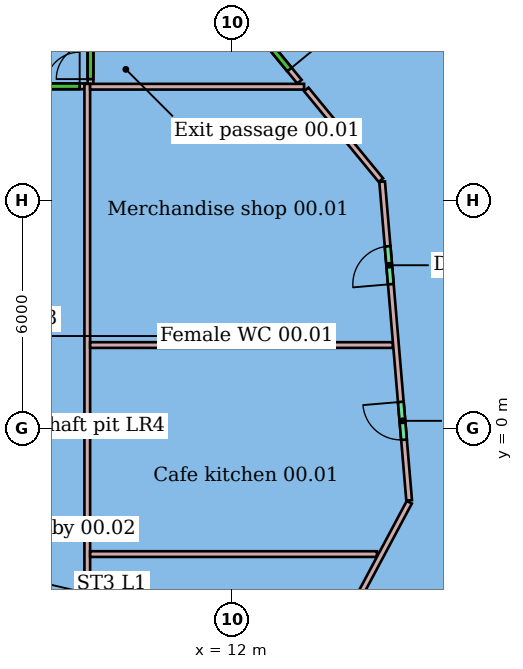
"""IFC4 building model, lengths in metres.
Left out: names, types, materials, properties, quantities, classifications, styles, units other than length and angle.
Written with IfcOpenShell. Run it as: python <this file> out.ifc"""

import sys

from ifc_helpers import new_model, si_unit, direction, frame, frame_2d, origin, place, context, subcontext, project, spatial, rectangle, extrude, element, fill, save


model = new_model("IFC4")
c1 = context("Model", 3, precision=1e-05, world=origin(), true_north=direction((0.0, 1.0)))
c2 = subcontext(c1, "Body", "Model", "MODEL_VIEW")
j1 = project(units=[si_unit("LENGTHUNIT", "METRE"), si_unit("PLANEANGLEUNIT", "RADIAN")], contexts=[c1])
p1 = place(None, origin())
s1 = spatial("IfcSite", under=j1, at=p1, CompositionType="ELEMENT")
p2 = place(p1, origin())
s2 = spatial("IfcBuilding", under=s1, at=p2, CompositionType="ELEMENT")
p3 = place(p2, origin())
s3 = spatial("IfcBuildingStorey", under=s2, at=p3, CompositionType="ELEMENT", Elevation=0.0)
p4 = place(p3, frame((8.2, -11.125, 0.0), z_axis=(0.0, 0.0, 1.0), x_axis=(0.0, 1.0, 0.0)))
e1 = element("IfcWall", 1, at=p4, inside=s3, PredefinedType="PARTITIONING", context=c2, shape_type="SweptSolid", body=[
    extrude(rectangle(XDim=20.2, YDim=0.15, at=frame_2d((10.1, 0.0))), origin(), (0.0, 0.0, 1.0), 7.35),
])
p5 = place(p3, frame((8.275, 9.0, 0.0), z_axis=(0.0, 0.0, 1.0), x_axis=(1.0, 0.0, 0.0)))
e2 = element("IfcWall", 2, at=p5, inside=s3, PredefinedType="PARTITIONING", context=c2, shape_type="SweptSolid", body=[
    extrude(rectangle(XDim=5.631, YDim=0.15, at=frame_2d((2.815, 0.0))), origin(), (0.0, 0.0, 1.0), 7.35),
])
p6 = place(p3, frame((13.964, 8.929, 0.0), z_axis=(0.0, 0.0, 1.0), x_axis=(0.635017397711, -0.772497834692, 0.0)))
e3 = element("IfcWall", 3, at=p6, inside=s3, PredefinedType="PARTITIONING", context=c2, shape_type="SweptSolid", body=[
    extrude(rectangle(XDim=3.09, YDim=0.15, at=frame_2d((1.545, 0.0))), origin(), (0.0, 0.0, 1.0), 7.35),
])
p7 = place(p3, frame((8.275, -3.298, 0.0), z_axis=(0.0, 0.0, 1.0), x_axis=(1.0, 0.0, 0.0)))
e4 = element("IfcWall", 4, at=p7, inside=s3, PredefinedType="PARTITIONING", context=c2, shape_type="SweptSolid", body=[
    extrude(rectangle(XDim=7.546, YDim=0.15, at=frame_2d((3.773, 0.0))), origin(), (0.0, 0.0, 1.0), 7.35),
])
p8 = place(p3, frame((12.676, -9.427, 0.0), z_axis=(0.0, 0.0, 1.0), x_axis=(0.470743396375, 0.882270171076, 0.0)))
e5 = element("IfcWall", 5, at=p8, inside=s3, PredefinedType="PARTITIONING", context=c2, shape_type="SweptSolid", body=[
    extrude(rectangle(XDim=8.493, YDim=0.15, at=frame_2d((4.247, 0.0))), origin(), (0.0, 0.0, 1.0), 7.35),
])
p9 = place(p3, frame((8.275, 2.202, 0.0), z_axis=(0.0, 0.0, 1.0), x_axis=(1.0, 0.0, 0.0)))
e6 = element("IfcWall", 6, at=p9, inside=s3, PredefinedType="PARTITIONING", context=c2, shape_type="SweptSolid", body=[
    extrude(rectangle(XDim=7.967, YDim=0.15, at=frame_2d((3.983, 0.0))), origin(), (0.0, 0.0, 1.0), 7.35),
])
p10 = place(p3, frame((16.67, -1.885, 0.0), z_axis=(0.0, 0.0, 1.0), x_axis=(-0.084490422104, 0.99642429144, 0.0)))
e7 = element("IfcWall", 7, at=p10, inside=s3, PredefinedType="PARTITIONING", context=c2, shape_type="SweptSolid", body=[
    extrude(rectangle(XDim=8.417, YDim=0.15, at=frame_2d((4.208, 0.0))), origin(), (0.0, 0.0, 1.0), 7.35),
])
p11 = place(p10, frame((1.601, 0.0, 0.0)))
e8 = element("IfcOpeningElement", 8, at=p11, cuts=e7, PredefinedType="OPENING", context=c2, shape_type="SweptSolid", body=[
    extrude(rectangle(XDim=1.0, YDim=2.1, at=frame_2d((0.5, 1.05))), frame((0.0, 0.085, 0.0), z_axis=(0.0, -1.0, 0.0), x_axis=(1.0, 0.0, 0.0)), (0.0, 0.0, 1.0), 0.17),
])
p12 = place(p10, frame((5.71, 0.0, 0.0)))
e9 = element("IfcOpeningElement", 9, at=p12, cuts=e7, PredefinedType="OPENING", context=c2, shape_type="SweptSolid", body=[
    extrude(rectangle(XDim=1.0, YDim=2.1, at=frame_2d((0.5, 1.05))), frame((0.0, 0.085, 0.0), z_axis=(0.0, -1.0, 0.0), x_axis=(1.0, 0.0, 0.0)), (0.0, 0.0, 1.0), 0.17),
])
p13 = place(p3, frame((8.285, 9.0, 0.0), z_axis=(0.0, 0.0, 1.0), x_axis=(0.0, 1.0, 0.0)))
e10 = element("IfcWall", 10, at=p13, inside=s3, PredefinedType="PARTITIONING", context=c2, shape_type="SweptSolid", body=[
    extrude(rectangle(XDim=2.2, YDim=0.15, at=frame_2d((1.1, 0.0))), origin(), (0.0, 0.0, 1.0), 7.35),
])
p14 = place(p13, frame((0.2, 0.0, 0.0)))
e11 = element("IfcOpeningElement", 11, at=p14, cuts=e10, PredefinedType="OPENING", context=c2, shape_type="SweptSolid", body=[
    extrude(rectangle(XDim=1.8, YDim=2.4, at=frame_2d((0.9, 1.2))), frame((0.0, 0.085, 0.0), z_axis=(0.0, -1.0, 0.0), x_axis=(1.0, 0.0, 0.0)), (0.0, 0.0, 1.0), 0.17),
])
p15 = place(p3, frame((12.115, 11.163, 0.0), z_axis=(0.0, 0.0, 1.0), x_axis=(0.63506228811, -0.772460931193, 0.0)))
e12 = element("IfcWall", 12, at=p15, inside=s3, PredefinedType="PARTITIONING", context=c2, shape_type="SweptSolid", body=[
    extrude(rectangle(XDim=2.628, YDim=0.15, at=frame_2d((1.314, 0.0))), origin(), (0.0, 0.0, 1.0), 7.35),
])
p16 = place(p15, frame((0.414, 0.0, 0.0)))
e13 = element("IfcOpeningElement", 13, at=p16, cuts=e12, PredefinedType="OPENING", context=c2, shape_type="SweptSolid", body=[
    extrude(rectangle(XDim=1.8, YDim=2.4, at=frame_2d((0.9, 1.2))), frame((0.0, 0.085, 0.0), z_axis=(0.0, -1.0, 0.0), x_axis=(1.0, 0.0, 0.0)), (0.0, 0.0, 1.0), 0.17),
])
p17 = place(p3, frame((6.0, 9.01, 0.0), z_axis=(0.0, 0.0, 1.0), x_axis=(1.0, 0.0, 0.0)))
e14 = element("IfcWall", 14, at=p17, inside=s3, PredefinedType="PARTITIONING", context=c2, shape_type="SweptSolid", body=[
    extrude(rectangle(XDim=2.2, YDim=0.15, at=frame_2d((1.1, 0.0))), origin(), (0.0, 0.0, 1.0), 7.35),
])
p18 = place(p17, frame((0.2, 0.0, 0.0)))
e15 = element("IfcOpeningElement", 15, at=p18, cuts=e14, PredefinedType="OPENING", context=c2, shape_type="SweptSolid", body=[
    extrude(rectangle(XDim=1.8, YDim=2.4, at=frame_2d((0.9, 1.2))), frame((0.0, 0.085, 0.0), z_axis=(0.0, -1.0, 0.0), x_axis=(1.0, 0.0, 0.0)), (0.0, 0.0, 1.0), 0.17),
])
p19 = place(p11, origin())
e16 = element("IfcDoor", 16, at=p19, inside=s3, OperationType="SINGLE_SWING_RIGHT", PredefinedType="DOOR", context=c2, shape_type="SweptSolid", body=[
    extrude(rectangle(XDim=1.0, YDim=2.1, at=frame_2d((0.5, 1.05))), frame((0.0, 0.025, 0.0), z_axis=(0.0, -1.0, 0.0), x_axis=(1.0, 0.0, 0.0)), (0.0, 0.0, 1.0), 0.05),
])
fill(e8, e16)
p20 = place(p12, origin())
e17 = element("IfcDoor", 17, at=p20, inside=s3, OperationType="SINGLE_SWING_LEFT", PredefinedType="DOOR", context=c2, shape_type="SweptSolid", body=[
    extrude(rectangle(XDim=1.0, YDim=2.1, at=frame_2d((0.5, 1.05))), frame((0.0, 0.025, 0.0), z_axis=(0.0, -1.0, 0.0), x_axis=(1.0, 0.0, 0.0)), (0.0, 0.0, 1.0), 0.05),
])
fill(e9, e17)
p21 = place(p18, origin())
e18 = element("IfcDoor", 18, at=p21, inside=s3, OperationType="DOUBLE_DOOR_SINGLE_SWING", PredefinedType="DOOR", context=c2, shape_type="SweptSolid", body=[
    extrude(rectangle(XDim=1.8, YDim=2.4, at=frame_2d((0.9, 1.2))), frame((0.0, 0.025, 0.0), z_axis=(0.0, -1.0, 0.0), x_axis=(1.0, 0.0, 0.0)), (0.0, 0.0, 1.0), 0.05),
])
fill(e15, e18)
p22 = place(p14, origin())
e19 = element("IfcDoor", 19, at=p22, inside=s3, OperationType="DOUBLE_DOOR_SINGLE_SWING", PredefinedType="DOOR", context=c2, shape_type="SweptSolid", body=[
    extrude(rectangle(XDim=1.8, YDim=2.4, at=frame_2d((0.9, 1.2))), frame((0.0, 0.025, 0.0), z_axis=(0.0, -1.0, 0.0), x_axis=(1.0, 0.0, 0.0)), (0.0, 0.0, 1.0), 0.05),
])
fill(e11, e19)
p23 = place(p16, origin())
e20 = element("IfcDoor", 20, at=p23, inside=s3, OperationType="DOUBLE_DOOR_SINGLE_SWING", PredefinedType="DOOR", context=c2, shape_type="SweptSolid", body=[
    extrude(rectangle(XDim=1.8, YDim=2.4, at=frame_2d((0.9, 1.2))), frame((0.0, 0.025, 0.0), z_axis=(0.0, -1.0, 0.0), x_axis=(1.0, 0.0, 0.0)), (0.0, 0.0, 1.0), 0.05),
])
fill(e13, e20)
save(model, sys.argv[1])
